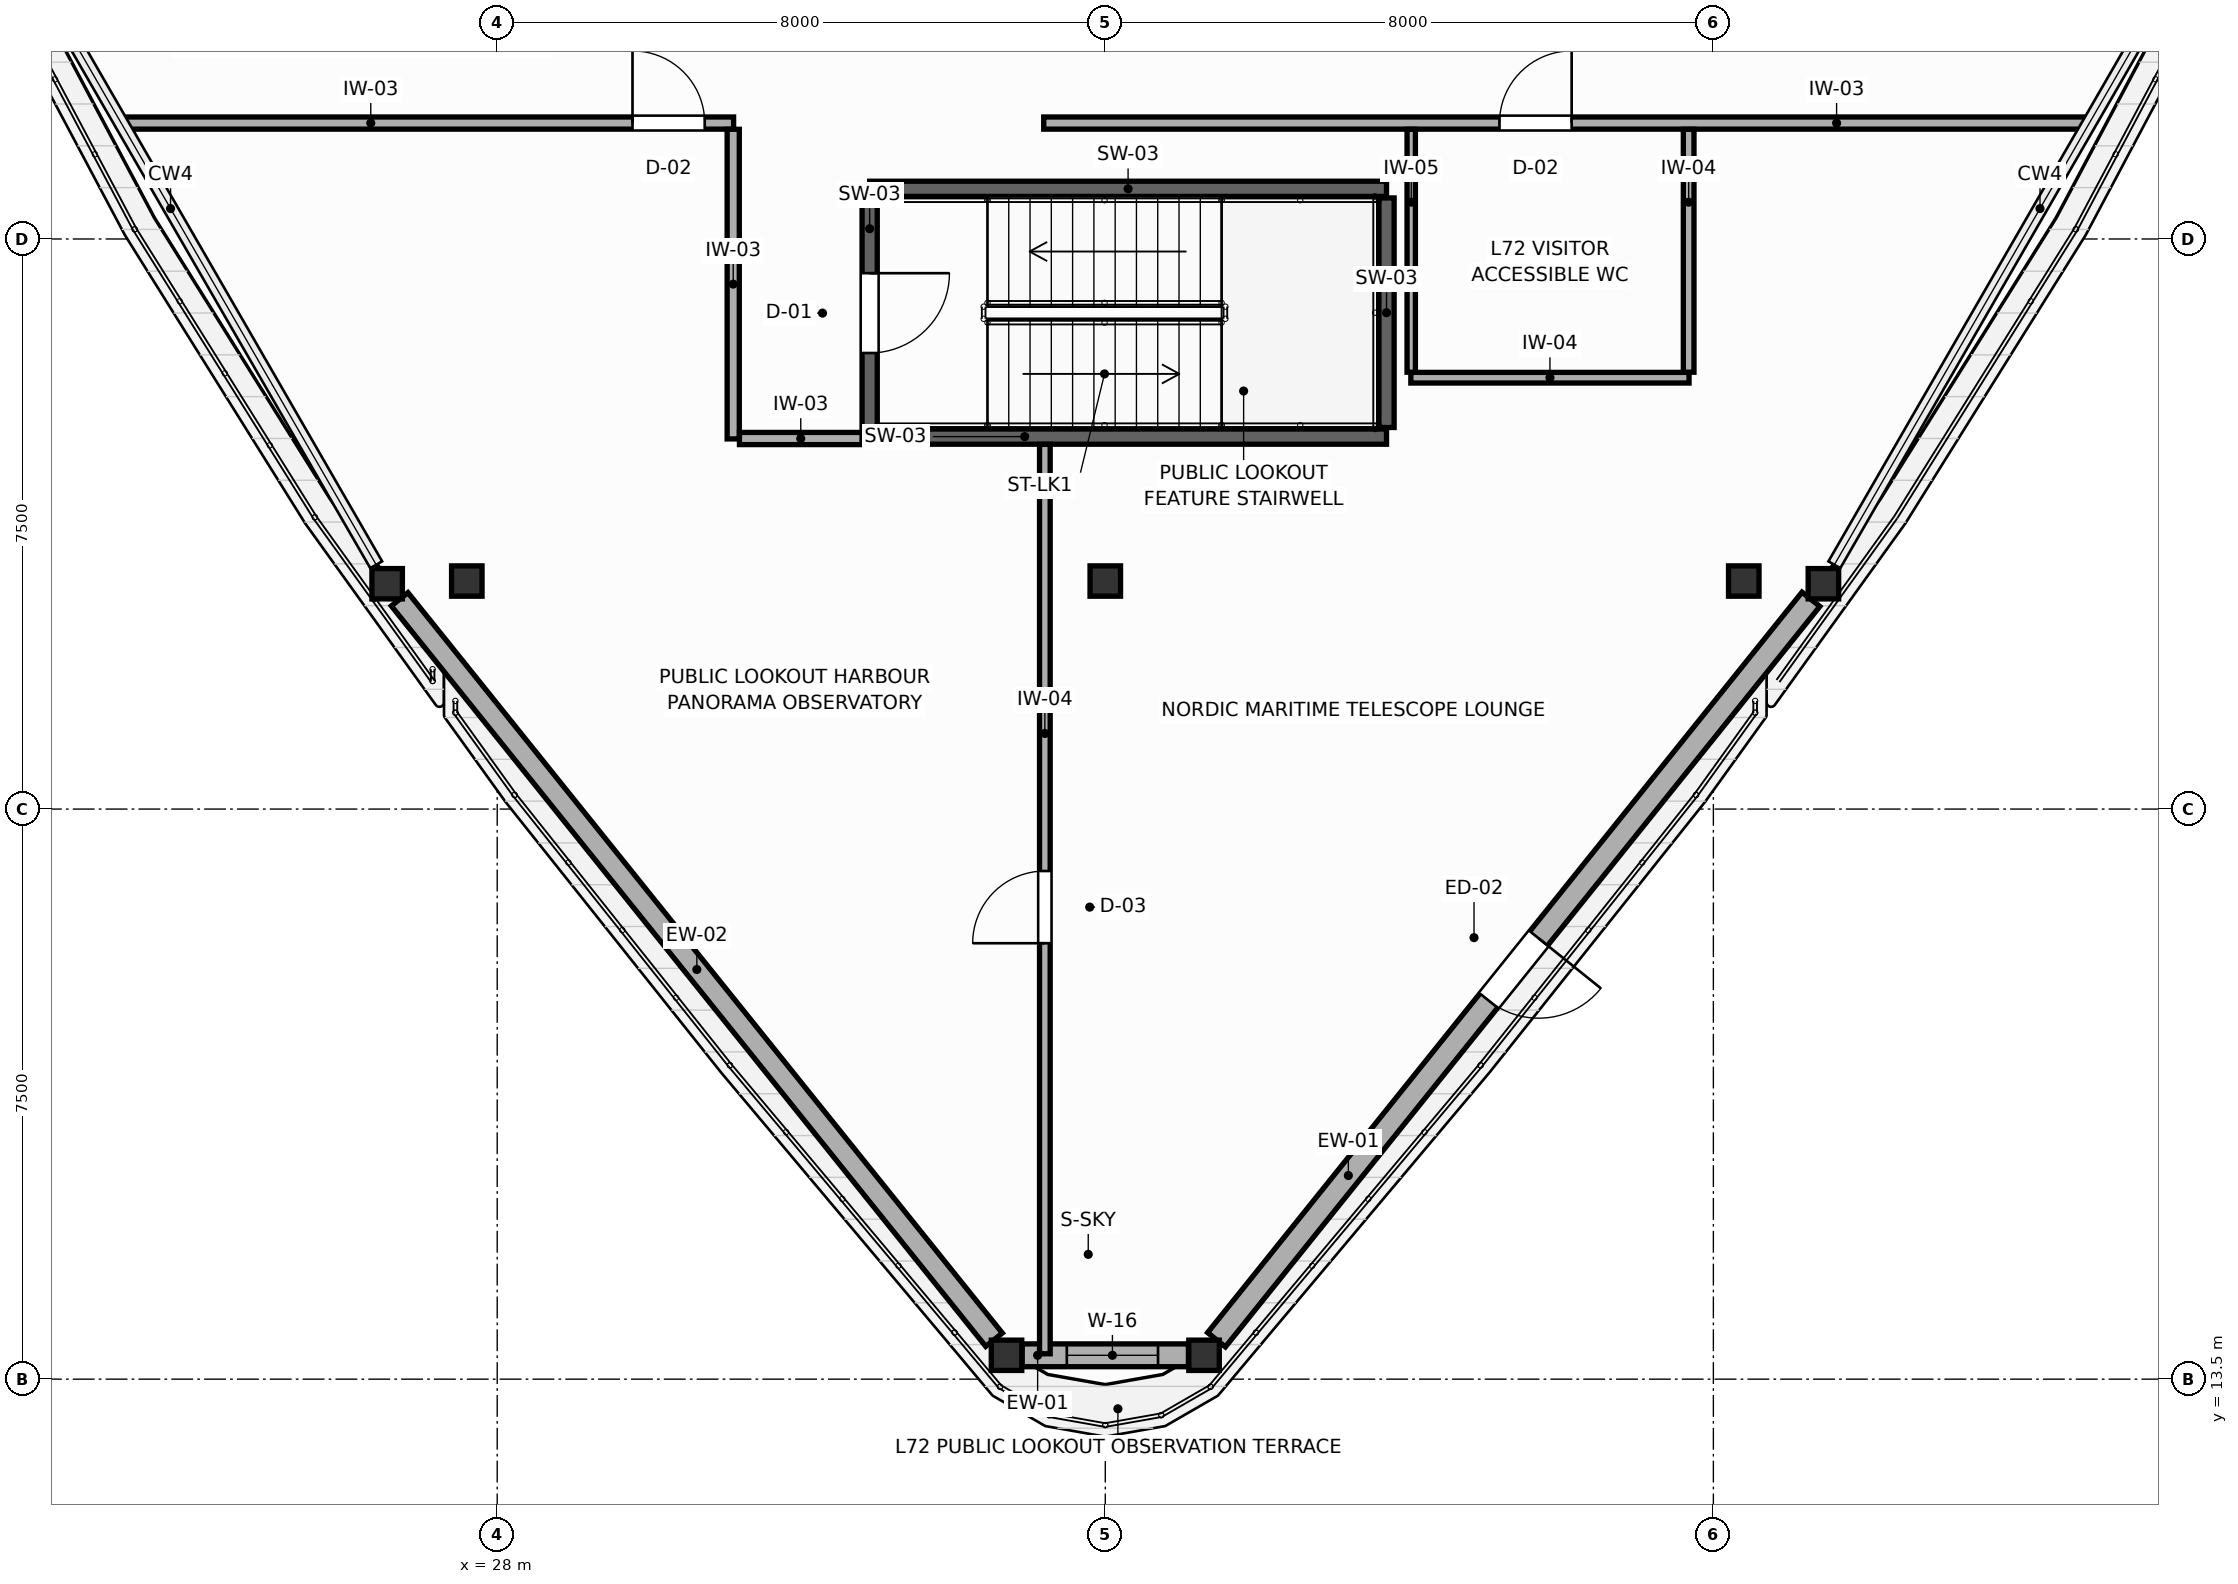
"""IFC4 building model, lengths in metres.
Left out: names, types, materials, properties, quantities, classifications, styles, units other than length and angle.
Written with IfcOpenShell. Run it as: python <this file> out.ifc"""

import sys

from ifc_helpers import new_model, si_unit, direction, frame, frame_2d, origin, origin_2d, place, context, subcontext, project, spatial, rectangle, i_section, extrude, source, transform, mapped, element, fill, save


model = new_model("IFC4")
c1 = context("Model", 3, precision=1e-05, world=origin(), true_north=direction((0.0, 1.0)))
c2 = subcontext(c1, "Body", "Model", "MODEL_VIEW")
j1 = project(units=[si_unit("LENGTHUNIT", "METRE"), si_unit("PLANEANGLEUNIT", "RADIAN")], contexts=[c1])
p1 = place(None, origin())
s1 = spatial("IfcSite", under=j1, at=p1, CompositionType="ELEMENT")
p2 = place(p1, origin())
s2 = spatial("IfcBuilding", under=s1, at=p2, CompositionType="ELEMENT")
p3 = place(p2, frame((0.0, 0.0, 275.4)))
s3 = spatial("IfcBuildingStorey", under=s2, at=p3, CompositionType="ELEMENT", Elevation=275.4)
m1 = source(origin(), c2, "Body", "SweptSolid", [
    extrude(i_section(OverallWidth=0.401, OverallDepth=0.399, WebThickness=0.022, FlangeThickness=0.036, FilletRadius=0.015, at=origin_2d()), origin(), (0.0, 0.0, 1.0), 4.2),
])
for number, where, z_axis, x_axis in (
    (1, (27.6, 24.0, 0.0), (0.0, 0.0, 1.0), (1.0, 0.0, 0.0)),
    (2, (44.4, 24.0, 0.0), (0.0, 0.0, 1.0), (1.0, 0.0, 0.0)),
    (3, (36.0, 24.0, 0.0), (0.0, 0.0, 1.0), (1.0, 0.0, 0.0)),
):
    element("IfcColumn", number, at=place(p3, frame(where, z_axis=z_axis, x_axis=x_axis)), inside=s3, PredefinedType="COLUMN", context=c2, shape_type="MappedRepresentation", body=[
        mapped(m1, transform((0.0, 0.0, 0.0), scale=1.0)),
    ])
for number, where, z_axis, x_axis in (
    (4, (32.9, 29.16, 0.0), (0.0, 0.0, 1.0), (1.0, 0.0, 0.0)),
    (5, (32.9, 25.9, 0.0), (0.0, 0.0, 1.0), (1.0, 0.0, 0.0)),
):
    element("IfcWall", number, at=place(p3, frame(where, z_axis=z_axis, x_axis=x_axis)), inside=s3, PredefinedType="SHEAR", context=c2, shape_type="SweptSolid", body=[
        extrude(rectangle(XDim=6.8, YDim=0.2, at=frame_2d((3.4, 0.0))), origin(), (0.0, 0.0, 1.0), 4.2),
    ])
p4 = place(p3, frame((39.7, 26.02, 0.0), z_axis=(0.0, 0.0, 1.0), x_axis=(0.0, 1.0, 0.0)))
e6 = element("IfcWall", 6, at=p4, inside=s3, PredefinedType="SHEAR", context=c2, shape_type="SweptSolid", body=[
    extrude(rectangle(XDim=3.02, YDim=0.2, at=frame_2d((1.51, 0.0))), origin(), (0.0, 0.0, 1.0), 4.2),
])
for number, where, z_axis, x_axis in (
    (7, (26.552, 23.965, 0.0), (0.0, 0.0, 1.0), (1.0, 0.0, 0.0)),
    (8, (34.701, 13.814, 0.0), (0.0, 0.0, 1.0), (1.0, 0.0, 0.0)),
    (9, (37.299, 13.814, 0.0), (0.0, 0.0, 1.0), (1.0, 0.0, 0.0)),
    (10, (45.448, 23.965, 0.0), (0.0, 0.0, 1.0), (1.0, 0.0, 0.0)),
):
    element("IfcColumn", number, at=place(p3, frame(where, z_axis=z_axis, x_axis=x_axis)), inside=s3, PredefinedType="COLUMN", context=c2, shape_type="MappedRepresentation", body=[
        mapped(m1, transform((0.0, 0.0, 0.0), scale=1.0)),
    ])
p5 = place(p3, frame((26.716, 23.76, 0.0), z_axis=(0.0, 0.0, 1.0), x_axis=(0.626009756129, -0.779815225058, 0.0)))
e11 = element("IfcWall", 11, at=p5, inside=s3, PredefinedType="SOLIDWALL", context=c2, shape_type="SweptSolid", body=[
    extrude(rectangle(XDim=12.492, YDim=0.28, at=frame_2d((6.246, 0.0))), origin(), (0.0, 0.0, 1.0), 2.52),
])
p6 = place(p3, frame((34.906, 13.814, 0.0), z_axis=(0.0, 0.0, 1.0), x_axis=(1.0, 0.0, 0.0)))
e12 = element("IfcWall", 12, at=p6, inside=s3, PredefinedType="SOLIDWALL", context=c2, shape_type="SweptSolid", body=[
    extrude(rectangle(XDim=2.188, YDim=0.3, at=frame_2d((1.094, 0.0))), origin(), (0.0, 0.0, 1.0), 2.52),
])
p7 = place(p6, frame((0.588, 0.0, 0.75)))
e13 = element("IfcOpeningElement", 13, at=p7, cuts=e12, PredefinedType="OPENING", context=c2, shape_type="SweptSolid", body=[
    extrude(rectangle(XDim=1.2, YDim=1.55, at=frame_2d((0.6, 0.775))), frame((0.0, 0.16, 0.0), z_axis=(0.0, -1.0, 0.0), x_axis=(1.0, 0.0, 0.0)), (0.0, 0.0, 1.0), 0.32),
])
p8 = place(p3, frame((37.463, 14.018, 0.0), z_axis=(0.0, 0.0, 1.0), x_axis=(0.626009756129, 0.779815225058, 0.0)))
e14 = element("IfcWall", 14, at=p8, inside=s3, PredefinedType="SOLIDWALL", context=c2, shape_type="SweptSolid", body=[
    extrude(rectangle(XDim=12.492, YDim=0.3, at=frame_2d((6.246, 0.0))), origin(), (0.0, 0.0, 1.0), 2.52),
])
p9 = place(p8, frame((5.721, 0.0, 0.0)))
e15 = element("IfcOpeningElement", 15, at=p9, cuts=e14, PredefinedType="OPENING", context=c2, shape_type="SweptSolid", body=[
    extrude(rectangle(XDim=1.05, YDim=2.1, at=frame_2d((0.525, 1.05))), frame((0.0, 0.16, 0.0), z_axis=(0.0, -1.0, 0.0), x_axis=(1.0, 0.0, 0.0)), (0.0, 0.0, 1.0), 0.32),
])
p10 = place(p3, frame((32.9, 26.02, 0.0), z_axis=(0.0, 0.0, 1.0), x_axis=(0.0, 1.0, 0.0)))
e16 = element("IfcWall", 16, at=p10, inside=s3, PredefinedType="SHEAR", context=c2, shape_type="SweptSolid", body=[
    extrude(rectangle(XDim=3.02, YDim=0.2, at=frame_2d((1.51, 0.0))), origin(), (0.0, 0.0, 1.0), 4.2),
])
p11 = place(p10, frame((0.98, 0.0, 0.0)))
e17 = element("IfcOpeningElement", 17, at=p11, cuts=e16, PredefinedType="OPENING", context=c2, shape_type="SweptSolid", body=[
    extrude(rectangle(XDim=1.05, YDim=2.1, at=frame_2d((0.525, 1.05))), frame((0.0, 0.11, 0.0), z_axis=(0.0, -1.0, 0.0), x_axis=(1.0, 0.0, 0.0)), (0.0, 0.0, 1.0), 0.22),
])
p12 = place(p3, frame((35.19, 30.025, 0.0), z_axis=(0.0, 0.0, 1.0), x_axis=(1.0, 0.0, 0.0)))
e18 = element("IfcWall", 18, at=p12, inside=s3, PredefinedType="PARTITIONING", context=c2, shape_type="SweptSolid", body=[
    extrude(rectangle(XDim=13.737, YDim=0.16, at=frame_2d((6.868, 0.0))), origin(), (0.0, 0.0, 1.0), 3.96),
])
p13 = place(p12, frame((5.996, 0.0, 0.0)))
e19 = element("IfcOpeningElement", 19, at=p13, cuts=e18, PredefinedType="OPENING", context=c2, shape_type="SweptSolid", body=[
    extrude(rectangle(XDim=0.95, YDim=2.05, at=frame_2d((0.475, 1.025))), frame((0.0, 0.09, 0.0), z_axis=(0.0, -1.0, 0.0), x_axis=(1.0, 0.0, 0.0)), (0.0, 0.0, 1.0), 0.18),
])
p14 = place(p3, frame((23.073, 30.025, 0.0), z_axis=(0.0, 0.0, 1.0), x_axis=(1.0, 0.0, 0.0)))
e20 = element("IfcWall", 20, at=p14, inside=s3, PredefinedType="PARTITIONING", context=c2, shape_type="SweptSolid", body=[
    extrude(rectangle(XDim=8.037, YDim=0.16, at=frame_2d((4.019, 0.0))), origin(), (0.0, 0.0, 1.0), 3.96),
])
p15 = place(p14, frame((6.707, 0.0, 0.0)))
e21 = element("IfcOpeningElement", 21, at=p15, cuts=e20, PredefinedType="OPENING", context=c2, shape_type="SweptSolid", body=[
    extrude(rectangle(XDim=0.95, YDim=2.05, at=frame_2d((0.475, 1.025))), frame((0.0, 0.09, 0.0), z_axis=(0.0, -1.0, 0.0), x_axis=(1.0, 0.0, 0.0)), (0.0, 0.0, 1.0), 0.18),
])
p16 = place(p3, frame((31.105, 25.87, 0.0), z_axis=(0.0, 0.0, 1.0), x_axis=(0.0, 1.0, 0.0)))
e22 = element("IfcWall", 22, at=p16, inside=s3, PredefinedType="PARTITIONING", context=c2, shape_type="SweptSolid", body=[
    extrude(rectangle(XDim=4.073, YDim=0.16, at=frame_2d((2.037, 0.0))), origin(), (0.0, 0.0, 1.0), 3.96),
])
p17 = place(p3, frame((31.187, 25.875, 0.0), z_axis=(0.0, 0.0, 1.0), x_axis=(1.0, 0.0, 0.0)))
e23 = element("IfcWall", 23, at=p17, inside=s3, PredefinedType="PARTITIONING", context=c2, shape_type="SweptSolid", body=[
    extrude(rectangle(XDim=1.613, YDim=0.16, at=frame_2d((0.807, 0.0))), origin(), (0.0, 0.0, 1.0), 3.96),
])
p18 = place(p3, frame((35.205, 13.834, 0.0), z_axis=(0.0, 0.0, 1.0), x_axis=(0.0, 1.0, 0.0)))
e24 = element("IfcWall", 24, at=p18, inside=s3, PredefinedType="PARTITIONING", context=c2, shape_type="SweptSolid", body=[
    extrude(rectangle(XDim=11.964, YDim=0.14, at=frame_2d((5.982, 0.0))), origin(), (0.0, 0.0, 1.0), 2.52),
])
p19 = place(p18, frame((5.401, 0.0, 0.0)))
e25 = element("IfcOpeningElement", 25, at=p19, cuts=e24, PredefinedType="OPENING", context=c2, shape_type="SweptSolid", body=[
    extrude(rectangle(XDim=0.95, YDim=2.05, at=frame_2d((0.475, 1.025))), frame((0.0, 0.08, 0.0), z_axis=(0.0, -1.0, 0.0), x_axis=(1.0, 0.0, 0.0)), (0.0, 0.0, 1.0), 0.16),
])
p20 = place(p3, frame((40.02, 26.675, 0.0), z_axis=(0.0, 0.0, 1.0), x_axis=(1.0, 0.0, 0.0)))
e26 = element("IfcWall", 26, at=p20, inside=s3, PredefinedType="PARTITIONING", context=c2, shape_type="SweptSolid", body=[
    extrude(rectangle(XDim=3.66, YDim=0.14, at=frame_2d((1.83, 0.0))), origin(), (0.0, 0.0, 1.0), 3.96),
])
p21 = place(p3, frame((43.675, 26.747, 0.0), z_axis=(0.0, 0.0, 1.0), x_axis=(0.0, 1.0, 0.0)))
e27 = element("IfcWall", 27, at=p21, inside=s3, PredefinedType="PARTITIONING", context=c2, shape_type="SweptSolid", body=[
    extrude(rectangle(XDim=3.196, YDim=0.14, at=frame_2d((1.598, 0.0))), origin(), (0.0, 0.0, 1.0), 3.96),
])
p22 = place(p3, frame((40.025, 26.747, 0.0), z_axis=(0.0, 0.0, 1.0), x_axis=(0.0, 1.0, 0.0)))
e28 = element("IfcWall", 28, at=p22, inside=s3, PredefinedType="MOVABLE", context=c2, shape_type="SweptSolid", body=[
    extrude(rectangle(XDim=3.196, YDim=0.11, at=frame_2d((1.598, 0.0))), origin(), (0.0, 0.0, 1.0), 3.96),
])
p23 = place(p7, origin())
e29 = element("IfcWindow", 29, at=p23, inside=s3, PartitioningType="SINGLE_PANEL", PredefinedType="WINDOW", context=c2, shape_type="SweptSolid", body=[
    extrude(rectangle(XDim=1.2, YDim=1.55, at=frame_2d((0.6, 0.775))), frame((0.0, 0.03, 0.0), z_axis=(0.0, -1.0, 0.0), x_axis=(1.0, 0.0, 0.0)), (0.0, 0.0, 1.0), 0.06),
])
fill(e13, e29)
p24 = place(p9, frame((1.05, 0.0, 0.0), z_axis=(0.0, 0.0, 1.0), x_axis=(-1.0, 0.0, 0.0)))
e30 = element("IfcDoor", 30, at=p24, inside=s3, OperationType="SINGLE_SWING_LEFT", PredefinedType="DOOR", context=c2, shape_type="SweptSolid", body=[
    extrude(rectangle(XDim=1.05, YDim=2.1, at=frame_2d((0.525, 1.05))), frame((0.0, 0.025, 0.0), z_axis=(0.0, -1.0, 0.0), x_axis=(1.0, 0.0, 0.0)), (0.0, 0.0, 1.0), 0.05),
])
fill(e15, e30)
p25 = place(p11, frame((1.05, 0.0, 0.0), z_axis=(0.0, 0.0, 1.0), x_axis=(-1.0, 0.0, 0.0)))
e31 = element("IfcDoor", 31, at=p25, inside=s3, OperationType="SINGLE_SWING_LEFT", PredefinedType="DOOR", context=c2, shape_type="SweptSolid", body=[
    extrude(rectangle(XDim=1.05, YDim=2.1, at=frame_2d((0.525, 1.05))), frame((0.0, 0.025, 0.0), z_axis=(0.0, -1.0, 0.0), x_axis=(1.0, 0.0, 0.0)), (0.0, 0.0, 1.0), 0.05),
])
fill(e17, e31)
p26 = place(p13, origin())
e32 = element("IfcDoor", 32, at=p26, inside=s3, OperationType="SINGLE_SWING_RIGHT", PredefinedType="DOOR", context=c2, shape_type="SweptSolid", body=[
    extrude(rectangle(XDim=0.95, YDim=2.05, at=frame_2d((0.475, 1.025))), frame((0.0, 0.025, 0.0), z_axis=(0.0, -1.0, 0.0), x_axis=(1.0, 0.0, 0.0)), (0.0, 0.0, 1.0), 0.05),
])
fill(e19, e32)
p27 = place(p15, origin())
e33 = element("IfcDoor", 33, at=p27, inside=s3, OperationType="SINGLE_SWING_LEFT", PredefinedType="DOOR", context=c2, shape_type="SweptSolid", body=[
    extrude(rectangle(XDim=0.95, YDim=2.05, at=frame_2d((0.475, 1.025))), frame((0.0, 0.025, 0.0), z_axis=(0.0, -1.0, 0.0), x_axis=(1.0, 0.0, 0.0)), (0.0, 0.0, 1.0), 0.05),
])
fill(e21, e33)
p28 = place(p19, origin())
e34 = element("IfcDoor", 34, at=p28, inside=s3, OperationType="SINGLE_SWING_LEFT", PredefinedType="DOOR", context=c2, shape_type="SweptSolid", body=[
    extrude(rectangle(XDim=0.95, YDim=2.05, at=frame_2d((0.475, 1.025))), frame((0.0, 0.025, 0.0), z_axis=(0.0, -1.0, 0.0), x_axis=(1.0, 0.0, 0.0)), (0.0, 0.0, 1.0), 0.05),
])
fill(e25, e34)
save(model, sys.argv[1])
